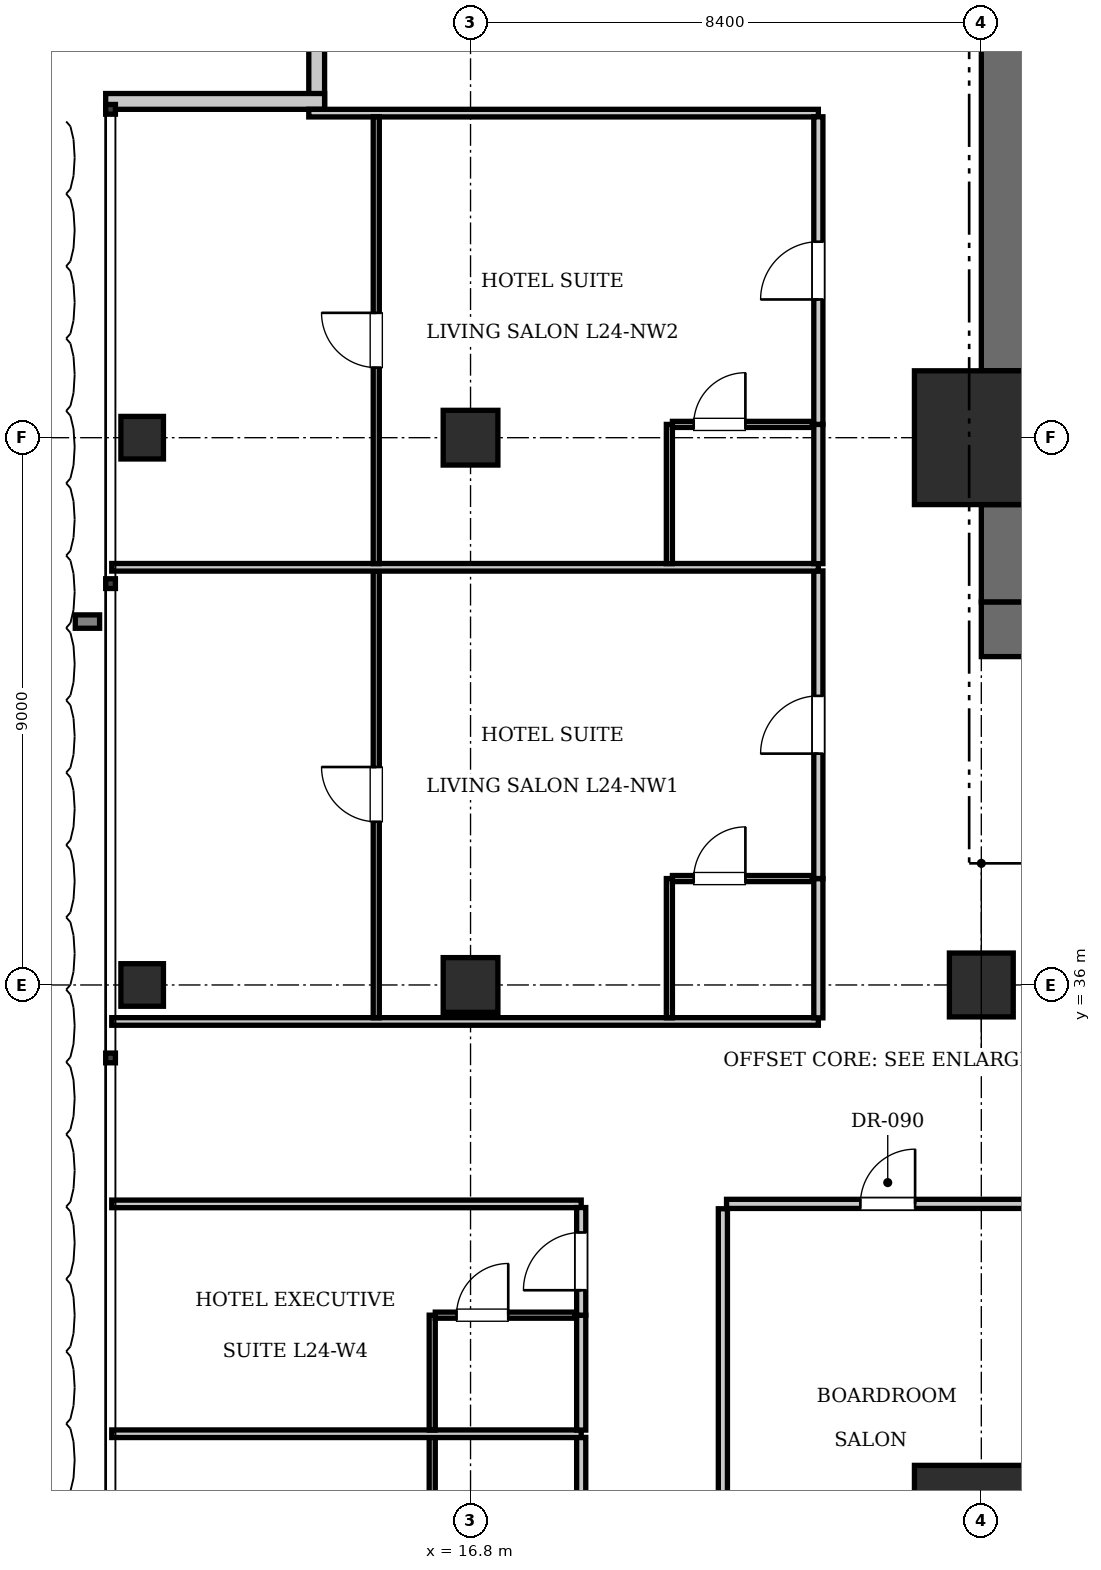
"""IFC4 building model, lengths in metres.
Left out: names, types, materials, properties, quantities, classifications, styles, units other than length and angle.
Written with IfcOpenShell. Run it as: python <this file> out.ifc"""

import sys

from ifc_helpers import new_model, si_unit, direction, frame, frame_2d, origin, origin_2d, place, context, subcontext, project, spatial, rectangle, i_section, extrude, element, fill, save


model = new_model("IFC4")
c1 = context("Model", 3, precision=1e-05, world=origin(), true_north=direction((0.0, 1.0)))
c2 = subcontext(c1, "Body", "Model", "MODEL_VIEW")
j1 = project(units=[si_unit("LENGTHUNIT", "METRE"), si_unit("PLANEANGLEUNIT", "RADIAN")], contexts=[c1])
p1 = place(None, origin())
s1 = spatial("IfcSite", under=j1, at=p1, CompositionType="ELEMENT")
p2 = place(p1, origin())
s2 = spatial("IfcBuilding", under=s1, at=p2, CompositionType="ELEMENT")
p3 = place(p2, frame((0.0, 0.0, 100.1)))
s3 = spatial("IfcBuildingStorey", under=s2, at=p3, CompositionType="ELEMENT", Elevation=100.1)
for number, where, z_axis, x_axis in (
    (1, (25.2, 27.0, 0.0), (0.0, 0.0, 1.0), (1.0, 0.0, 0.0)),
    (2, (25.2, 45.0, 0.0), (0.0, 0.0, 1.0), (1.0, 0.0, 0.0)),
):
    element("IfcColumn", number, at=place(p3, frame(where, z_axis=z_axis, x_axis=x_axis)), inside=s3, PredefinedType="COLUMN", context=c2, shape_type="SweptSolid", body=[
        extrude(rectangle(XDim=2.2, YDim=2.2, at=origin_2d()), origin(), (0.0, 0.0, 1.0), 3.85),
    ])
p4 = place(p3, frame((25.2, 41.85, 0.0), z_axis=(0.0, 0.0, 1.0), x_axis=(1.0, 0.0, 0.0)))
e3 = element("IfcWall", 3, at=p4, inside=s3, PredefinedType="SHEAR", context=c2, shape_type="SweptSolid", body=[
    extrude(rectangle(XDim=6.8, YDim=0.9, at=frame_2d((3.4, 0.0))), origin(), (0.0, 0.0, 1.0), 3.85),
])
p5 = place(p4, frame((1.65, 0.0, 0.0)))
e4 = element("IfcOpeningElement", 4, at=p5, cuts=e3, PredefinedType="OPENING", context=c2, shape_type="SweptSolid", body=[
    extrude(rectangle(XDim=1.15, YDim=2.15, at=frame_2d((0.575, 1.075))), frame((0.0, 0.46, 0.0), z_axis=(0.0, -1.0, 0.0), x_axis=(1.0, 0.0, 0.0)), (0.0, 0.0, 1.0), 0.92),
])
p6 = place(p4, frame((5.15, 0.0, 0.0)))
e5 = element("IfcOpeningElement", 5, at=p6, cuts=e3, PredefinedType="OPENING", context=c2, shape_type="SweptSolid", body=[
    extrude(rectangle(XDim=1.1, YDim=2.2, at=frame_2d((0.55, 1.1))), frame((0.0, 0.46, 0.0), z_axis=(0.0, -1.0, 0.0), x_axis=(1.0, 0.0, 0.0)), (0.0, 0.0, 1.0), 0.92),
])
p7 = place(p3, frame((25.65, 42.3, 0.0), z_axis=(0.0, 0.0, 1.0), x_axis=(0.0, 1.0, 0.0)))
e6 = element("IfcWall", 6, at=p7, inside=s3, PredefinedType="SHEAR", context=c2, shape_type="SweptSolid", body=[
    extrude(rectangle(XDim=1.6, YDim=0.9, at=frame_2d((0.8, 0.0))), origin(), (0.0, 0.0, 1.0), 3.85),
])
p8 = place(p3, frame((25.65, 46.1, 0.0), z_axis=(0.0, 0.0, 1.0), x_axis=(0.0, 1.0, 0.0)))
e7 = element("IfcWall", 7, at=p8, inside=s3, PredefinedType="SHEAR", context=c2, shape_type="SweptSolid", body=[
    extrude(rectangle(XDim=7.0, YDim=0.9, at=frame_2d((3.5, 0.0))), origin(), (0.0, 0.0, 1.0), 3.85),
])
p9 = place(p3, frame((25.2, 36.0, 0.0), z_axis=(0.0, 0.0, 1.0), x_axis=(1.0, 0.0, 0.0)))
e8 = element("IfcColumn", 8, at=p9, inside=s3, PredefinedType="COLUMN", context=c2, shape_type="SweptSolid", body=[
    extrude(rectangle(XDim=1.05, YDim=1.05, at=origin_2d()), origin(), (0.0, 0.0, 1.0), 3.85),
])
for number, where, z_axis, x_axis in (
    (9, (16.8, 36.0, 0.0), (0.0, 0.0, 1.0), (1.0, 0.0, 0.0)),
    (10, (16.8, 45.0, 0.0), (0.0, 0.0, 1.0), (1.0, 0.0, 0.0)),
):
    element("IfcColumn", number, at=place(p3, frame(where, z_axis=z_axis, x_axis=x_axis)), inside=s3, PredefinedType="COLUMN", context=c2, shape_type="SweptSolid", body=[
        extrude(rectangle(XDim=0.9, YDim=0.9, at=origin_2d()), origin(), (0.0, 0.0, 1.0), 3.85),
    ])
for number, where, z_axis, x_axis in (
    (11, (11.4, 36.0, 0.0), (0.0, 0.0, 1.0), (1.0, 0.0, 0.0)),
    (12, (11.4, 45.0, 0.0), (0.0, 0.0, 1.0), (1.0, 0.0, 0.0)),
):
    element("IfcColumn", number, at=place(p3, frame(where, z_axis=z_axis, x_axis=x_axis)), inside=s3, PredefinedType="COLUMN", context=c2, shape_type="SweptSolid", body=[
        extrude(i_section(OverallWidth=0.7, OverallDepth=0.7, WebThickness=0.028, FlangeThickness=0.044, at=origin_2d()), origin(), (0.0, 0.0, 1.0), 3.85),
    ])
p10 = place(p3, frame((14.27, 50.4, 0.0), z_axis=(0.0, 0.0, 1.0), x_axis=(0.0, 1.0, 0.0)))
e13 = element("IfcWall", 13, at=p10, inside=s3, PredefinedType="SOLIDWALL", context=c2, shape_type="SweptSolid", body=[
    extrude(rectangle(XDim=3.6, YDim=0.26, at=frame_2d((1.8, 0.0))), origin(), (0.0, 0.0, 1.0), 3.61),
])
p11 = place(p3, frame((10.8, 50.53, 0.0), z_axis=(0.0, 0.0, 1.0), x_axis=(1.0, 0.0, 0.0)))
e14 = element("IfcWall", 14, at=p11, inside=s3, PredefinedType="SOLIDWALL", context=c2, shape_type="SweptSolid", body=[
    extrude(rectangle(XDim=3.6, YDim=0.26, at=frame_2d((1.8, 0.0))), origin(), (0.0, 0.0, 1.0), 3.61),
])
p12 = place(p3, frame((20.95, 24.98, 0.0), z_axis=(0.0, 0.0, 1.0), x_axis=(0.0, 1.0, 0.0)))
e15 = element("IfcWall", 15, at=p12, inside=s3, PredefinedType="PARTITIONING", context=c2, shape_type="SweptSolid", body=[
    extrude(rectangle(XDim=7.34, YDim=0.15, at=frame_2d((3.67, 0.0))), origin(), (0.0, 0.0, 1.0), 3.255),
])
p13 = place(p3, frame((21.01, 32.4, 0.0), z_axis=(0.0, 0.0, 1.0), x_axis=(1.0, 0.0, 0.0)))
e16 = element("IfcWall", 16, at=p13, inside=s3, PredefinedType="PARTITIONING", context=c2, shape_type="SweptSolid", body=[
    extrude(rectangle(XDim=5.302, YDim=0.15, at=frame_2d((2.651, 0.0))), origin(), (0.0, 0.0, 1.0), 3.61),
])
p14 = place(p13, frame((2.201, 0.0, 0.0)))
e17 = element("IfcOpeningElement", 17, at=p14, cuts=e16, PredefinedType="OPENING", context=c2, shape_type="SweptSolid", body=[
    extrude(rectangle(XDim=0.9, YDim=2.1, at=frame_2d((0.45, 1.05))), frame((0.0, 0.085, 0.0), z_axis=(0.0, -1.0, 0.0), x_axis=(1.0, 0.0, 0.0)), (0.0, 0.0, 1.0), 0.17),
])
p15 = place(p3, frame((10.9, 32.4, 0.0), z_axis=(0.0, 0.0, 1.0), x_axis=(1.0, 0.0, 0.0)))
e18 = element("IfcWall", 18, at=p15, inside=s3, PredefinedType="PARTITIONING", context=c2, shape_type="SweptSolid", body=[
    extrude(rectangle(XDim=7.72, YDim=0.125, at=frame_2d((3.86, 0.0))), origin(), (0.0, 0.0, 1.0), 3.61),
])
p16 = place(p3, frame((18.62, 26.67, 0.0), z_axis=(0.0, 0.0, 1.0), x_axis=(0.0, 1.0, 0.0)))
e19 = element("IfcWall", 19, at=p16, inside=s3, PredefinedType="PARTITIONING", context=c2, shape_type="SweptSolid", body=[
    extrude(rectangle(XDim=1.89, YDim=0.15, at=frame_2d((0.945, 0.0))), origin(), (0.0, 0.0, 1.0), 3.61),
])
p17 = place(p3, frame((16.17, 26.67, 0.0), z_axis=(0.0, 0.0, 1.0), x_axis=(0.0, 1.0, 0.0)))
e20 = element("IfcWall", 20, at=p17, inside=s3, PredefinedType="PARTITIONING", context=c2, shape_type="SweptSolid", body=[
    extrude(rectangle(XDim=1.89, YDim=0.1, at=frame_2d((0.945, 0.0))), origin(), (0.0, 0.0, 1.0), 3.61),
])
p18 = place(p3, frame((10.9, 28.62, 0.0), z_axis=(0.0, 0.0, 1.0), x_axis=(1.0, 0.0, 0.0)))
e21 = element("IfcWall", 21, at=p18, inside=s3, PredefinedType="PARTITIONING", context=c2, shape_type="SweptSolid", body=[
    extrude(rectangle(XDim=7.72, YDim=0.125, at=frame_2d((3.86, 0.0))), origin(), (0.0, 0.0, 1.0), 3.61),
])
p19 = place(p3, frame((18.62, 28.68, 0.0), z_axis=(0.0, 0.0, 1.0), x_axis=(0.0, 1.0, 0.0)))
e22 = element("IfcWall", 22, at=p19, inside=s3, PredefinedType="PARTITIONING", context=c2, shape_type="SweptSolid", body=[
    extrude(rectangle(XDim=1.89, YDim=0.15, at=frame_2d((0.945, 0.0))), origin(), (0.0, 0.0, 1.0), 3.61),
])
p20 = place(p3, frame((18.62, 30.57, 0.0), z_axis=(0.0, 0.0, 1.0), x_axis=(0.0, 1.0, 0.0)))
e23 = element("IfcWall", 23, at=p20, inside=s3, PredefinedType="PARTITIONING", context=c2, shape_type="SweptSolid", body=[
    extrude(rectangle(XDim=1.77, YDim=0.15, at=frame_2d((0.885, 0.0))), origin(), (0.0, 0.0, 1.0), 3.61),
])
p21 = place(p20, frame((0.41, 0.0, 0.0)))
e24 = element("IfcOpeningElement", 24, at=p21, cuts=e23, PredefinedType="OPENING", context=c2, shape_type="SweptSolid", body=[
    extrude(rectangle(XDim=0.95, YDim=2.15, at=frame_2d((0.475, 1.075))), frame((0.0, 0.085, 0.0), z_axis=(0.0, -1.0, 0.0), x_axis=(1.0, 0.0, 0.0)), (0.0, 0.0, 1.0), 0.17),
])
p22 = place(p3, frame((16.17, 28.68, 0.0), z_axis=(0.0, 0.0, 1.0), x_axis=(0.0, 1.0, 0.0)))
e25 = element("IfcWall", 25, at=p22, inside=s3, PredefinedType="PARTITIONING", context=c2, shape_type="SweptSolid", body=[
    extrude(rectangle(XDim=1.89, YDim=0.1, at=frame_2d((0.945, 0.0))), origin(), (0.0, 0.0, 1.0), 3.61),
])
p23 = place(p3, frame((16.22, 30.57, 0.0), z_axis=(0.0, 0.0, 1.0), x_axis=(1.0, 0.0, 0.0)))
e26 = element("IfcWall", 26, at=p23, inside=s3, PredefinedType="PARTITIONING", context=c2, shape_type="SweptSolid", body=[
    extrude(rectangle(XDim=2.3, YDim=0.1, at=frame_2d((1.15, 0.0))), origin(), (0.0, 0.0, 1.0), 3.61),
])
p24 = place(p23, frame((0.35, 0.0, 0.0)))
e27 = element("IfcOpeningElement", 27, at=p24, cuts=e26, PredefinedType="OPENING", context=c2, shape_type="SweptSolid", body=[
    extrude(rectangle(XDim=0.85, YDim=2.1, at=frame_2d((0.425, 1.05))), frame((0.0, 0.06, 0.0), z_axis=(0.0, -1.0, 0.0), x_axis=(1.0, 0.0, 0.0)), (0.0, 0.0, 1.0), 0.12),
])
p25 = place(p3, frame((10.9, 35.4, 0.0), z_axis=(0.0, 0.0, 1.0), x_axis=(1.0, 0.0, 0.0)))
e28 = element("IfcWall", 28, at=p25, inside=s3, PredefinedType="PARTITIONING", context=c2, shape_type="SweptSolid", body=[
    extrude(rectangle(XDim=11.62, YDim=0.125, at=frame_2d((5.81, 0.0))), origin(), (0.0, 0.0, 1.0), 3.61),
])
p26 = place(p3, frame((14.14, 50.337, 0.0), z_axis=(0.0, 0.0, 1.0), x_axis=(1.0, 0.0, 0.0)))
e29 = element("IfcWall", 29, at=p26, inside=s3, PredefinedType="PARTITIONING", context=c2, shape_type="SweptSolid", body=[
    extrude(rectangle(XDim=8.38, YDim=0.125, at=frame_2d((4.19, 0.0))), origin(), (0.0, 0.0, 1.0), 3.61),
])
p27 = place(p3, frame((22.52, 35.46, 0.0), z_axis=(0.0, 0.0, 1.0), x_axis=(0.0, 1.0, 0.0)))
e30 = element("IfcWall", 30, at=p27, inside=s3, PredefinedType="PARTITIONING", context=c2, shape_type="SweptSolid", body=[
    extrude(rectangle(XDim=2.29, YDim=0.15, at=frame_2d((1.145, 0.0))), origin(), (0.0, 0.0, 1.0), 3.61),
])
p28 = place(p3, frame((22.52, 37.75, 0.0), z_axis=(0.0, 0.0, 1.0), x_axis=(0.0, 1.0, 0.0)))
e31 = element("IfcWall", 31, at=p28, inside=s3, PredefinedType="PARTITIONING", context=c2, shape_type="SweptSolid", body=[
    extrude(rectangle(XDim=5.059, YDim=0.15, at=frame_2d((2.529, 0.0))), origin(), (0.0, 0.0, 1.0), 3.61),
])
p29 = place(p28, frame((2.054, 0.0, 0.0)))
e32 = element("IfcOpeningElement", 32, at=p29, cuts=e31, PredefinedType="OPENING", context=c2, shape_type="SweptSolid", body=[
    extrude(rectangle(XDim=0.95, YDim=2.15, at=frame_2d((0.475, 1.075))), frame((0.0, 0.085, 0.0), z_axis=(0.0, -1.0, 0.0), x_axis=(1.0, 0.0, 0.0)), (0.0, 0.0, 1.0), 0.17),
])
p30 = place(p3, frame((20.07, 35.46, 0.0), z_axis=(0.0, 0.0, 1.0), x_axis=(0.0, 1.0, 0.0)))
e33 = element("IfcWall", 33, at=p30, inside=s3, PredefinedType="PARTITIONING", context=c2, shape_type="SweptSolid", body=[
    extrude(rectangle(XDim=2.29, YDim=0.1, at=frame_2d((1.145, 0.0))), origin(), (0.0, 0.0, 1.0), 3.61),
])
p31 = place(p3, frame((20.12, 37.75, 0.0), z_axis=(0.0, 0.0, 1.0), x_axis=(1.0, 0.0, 0.0)))
e34 = element("IfcWall", 34, at=p31, inside=s3, PredefinedType="PARTITIONING", context=c2, shape_type="SweptSolid", body=[
    extrude(rectangle(XDim=2.3, YDim=0.1, at=frame_2d((1.15, 0.0))), origin(), (0.0, 0.0, 1.0), 3.61),
])
p32 = place(p31, frame((0.35, 0.0, 0.0)))
e35 = element("IfcOpeningElement", 35, at=p32, cuts=e34, PredefinedType="OPENING", context=c2, shape_type="SweptSolid", body=[
    extrude(rectangle(XDim=0.85, YDim=2.1, at=frame_2d((0.425, 1.05))), frame((0.0, 0.06, 0.0), z_axis=(0.0, -1.0, 0.0), x_axis=(1.0, 0.0, 0.0)), (0.0, 0.0, 1.0), 0.12),
])
p33 = place(p3, frame((15.25, 35.46, 0.0), z_axis=(0.0, 0.0, 1.0), x_axis=(0.0, 1.0, 0.0)))
e36 = element("IfcWall", 36, at=p33, inside=s3, PredefinedType="PARTITIONING", context=c2, shape_type="SweptSolid", body=[
    extrude(rectangle(XDim=7.349, YDim=0.1, at=frame_2d((3.674, 0.0))), origin(), (0.0, 0.0, 1.0), 3.61),
])
p34 = place(p33, frame((3.224, 0.0, 0.0)))
e37 = element("IfcOpeningElement", 37, at=p34, cuts=e36, PredefinedType="OPENING", context=c2, shape_type="SweptSolid", body=[
    extrude(rectangle(XDim=0.9, YDim=2.1, at=frame_2d((0.45, 1.05))), frame((0.0, 0.06, 0.0), z_axis=(0.0, -1.0, 0.0), x_axis=(1.0, 0.0, 0.0)), (0.0, 0.0, 1.0), 0.12),
])
p35 = place(p3, frame((10.9, 42.869, 0.0), z_axis=(0.0, 0.0, 1.0), x_axis=(1.0, 0.0, 0.0)))
e38 = element("IfcWall", 38, at=p35, inside=s3, PredefinedType="PARTITIONING", context=c2, shape_type="SweptSolid", body=[
    extrude(rectangle(XDim=11.62, YDim=0.125, at=frame_2d((5.81, 0.0))), origin(), (0.0, 0.0, 1.0), 3.61),
])
p36 = place(p3, frame((22.52, 42.929, 0.0), z_axis=(0.0, 0.0, 1.0), x_axis=(0.0, 1.0, 0.0)))
e39 = element("IfcWall", 39, at=p36, inside=s3, PredefinedType="PARTITIONING", context=c2, shape_type="SweptSolid", body=[
    extrude(rectangle(XDim=2.29, YDim=0.15, at=frame_2d((1.145, 0.0))), origin(), (0.0, 0.0, 1.0), 3.61),
])
p37 = place(p3, frame((22.52, 45.219, 0.0), z_axis=(0.0, 0.0, 1.0), x_axis=(0.0, 1.0, 0.0)))
e40 = element("IfcWall", 40, at=p37, inside=s3, PredefinedType="PARTITIONING", context=c2, shape_type="SweptSolid", body=[
    extrude(rectangle(XDim=5.059, YDim=0.15, at=frame_2d((2.529, 0.0))), origin(), (0.0, 0.0, 1.0), 3.61),
])
p38 = place(p37, frame((2.054, 0.0, 0.0)))
e41 = element("IfcOpeningElement", 41, at=p38, cuts=e40, PredefinedType="OPENING", context=c2, shape_type="SweptSolid", body=[
    extrude(rectangle(XDim=0.95, YDim=2.15, at=frame_2d((0.475, 1.075))), frame((0.0, 0.085, 0.0), z_axis=(0.0, -1.0, 0.0), x_axis=(1.0, 0.0, 0.0)), (0.0, 0.0, 1.0), 0.17),
])
p39 = place(p3, frame((20.07, 42.929, 0.0), z_axis=(0.0, 0.0, 1.0), x_axis=(0.0, 1.0, 0.0)))
e42 = element("IfcWall", 42, at=p39, inside=s3, PredefinedType="PARTITIONING", context=c2, shape_type="SweptSolid", body=[
    extrude(rectangle(XDim=2.29, YDim=0.1, at=frame_2d((1.145, 0.0))), origin(), (0.0, 0.0, 1.0), 3.61),
])
p40 = place(p3, frame((20.12, 45.219, 0.0), z_axis=(0.0, 0.0, 1.0), x_axis=(1.0, 0.0, 0.0)))
e43 = element("IfcWall", 43, at=p40, inside=s3, PredefinedType="PARTITIONING", context=c2, shape_type="SweptSolid", body=[
    extrude(rectangle(XDim=2.3, YDim=0.1, at=frame_2d((1.15, 0.0))), origin(), (0.0, 0.0, 1.0), 3.61),
])
p41 = place(p40, frame((0.35, 0.0, 0.0)))
e44 = element("IfcOpeningElement", 44, at=p41, cuts=e43, PredefinedType="OPENING", context=c2, shape_type="SweptSolid", body=[
    extrude(rectangle(XDim=0.85, YDim=2.1, at=frame_2d((0.425, 1.05))), frame((0.0, 0.06, 0.0), z_axis=(0.0, -1.0, 0.0), x_axis=(1.0, 0.0, 0.0)), (0.0, 0.0, 1.0), 0.12),
])
p42 = place(p3, frame((15.25, 42.929, 0.0), z_axis=(0.0, 0.0, 1.0), x_axis=(0.0, 1.0, 0.0)))
e45 = element("IfcWall", 45, at=p42, inside=s3, PredefinedType="PARTITIONING", context=c2, shape_type="SweptSolid", body=[
    extrude(rectangle(XDim=7.349, YDim=0.1, at=frame_2d((3.674, 0.0))), origin(), (0.0, 0.0, 1.0), 3.61),
])
p43 = place(p42, frame((3.224, 0.0, 0.0)))
e46 = element("IfcOpeningElement", 46, at=p43, cuts=e45, PredefinedType="OPENING", context=c2, shape_type="SweptSolid", body=[
    extrude(rectangle(XDim=0.9, YDim=2.1, at=frame_2d((0.45, 1.05))), frame((0.0, 0.06, 0.0), z_axis=(0.0, -1.0, 0.0), x_axis=(1.0, 0.0, 0.0)), (0.0, 0.0, 1.0), 0.12),
])
p44 = place(p14, origin())
e47 = element("IfcDoor", 47, at=p44, inside=s3, OperationType="SINGLE_SWING_RIGHT", PredefinedType="DOOR", context=c2, shape_type="SweptSolid", body=[
    extrude(rectangle(XDim=0.9, YDim=2.1, at=frame_2d((0.45, 1.05))), frame((0.0, 0.025, 0.0), z_axis=(0.0, -1.0, 0.0), x_axis=(1.0, 0.0, 0.0)), (0.0, 0.0, 1.0), 0.05),
])
fill(e17, e47)
p45 = place(p24, origin())
e48 = element("IfcDoor", 48, at=p45, inside=s3, OperationType="SINGLE_SWING_RIGHT", PredefinedType="DOOR", context=c2, shape_type="SweptSolid", body=[
    extrude(rectangle(XDim=0.85, YDim=2.1, at=frame_2d((0.425, 1.05))), frame((0.0, 0.025, 0.0), z_axis=(0.0, -1.0, 0.0), x_axis=(1.0, 0.0, 0.0)), (0.0, 0.0, 1.0), 0.05),
])
fill(e27, e48)
p46 = place(p21, origin())
e49 = element("IfcDoor", 49, at=p46, inside=s3, OperationType="SINGLE_SWING_LEFT", PredefinedType="DOOR", context=c2, shape_type="SweptSolid", body=[
    extrude(rectangle(XDim=0.95, YDim=2.15, at=frame_2d((0.475, 1.075))), frame((0.0, 0.025, 0.0), z_axis=(0.0, -1.0, 0.0), x_axis=(1.0, 0.0, 0.0)), (0.0, 0.0, 1.0), 0.05),
])
fill(e24, e49)
p47 = place(p32, origin())
e50 = element("IfcDoor", 50, at=p47, inside=s3, OperationType="SINGLE_SWING_RIGHT", PredefinedType="DOOR", context=c2, shape_type="SweptSolid", body=[
    extrude(rectangle(XDim=0.85, YDim=2.1, at=frame_2d((0.425, 1.05))), frame((0.0, 0.025, 0.0), z_axis=(0.0, -1.0, 0.0), x_axis=(1.0, 0.0, 0.0)), (0.0, 0.0, 1.0), 0.05),
])
fill(e35, e50)
p48 = place(p29, origin())
e51 = element("IfcDoor", 51, at=p48, inside=s3, OperationType="SINGLE_SWING_LEFT", PredefinedType="DOOR", context=c2, shape_type="SweptSolid", body=[
    extrude(rectangle(XDim=0.95, YDim=2.15, at=frame_2d((0.475, 1.075))), frame((0.0, 0.025, 0.0), z_axis=(0.0, -1.0, 0.0), x_axis=(1.0, 0.0, 0.0)), (0.0, 0.0, 1.0), 0.05),
])
fill(e32, e51)
p49 = place(p34, origin())
e52 = element("IfcDoor", 52, at=p49, inside=s3, OperationType="SINGLE_SWING_RIGHT", PredefinedType="DOOR", context=c2, shape_type="SweptSolid", body=[
    extrude(rectangle(XDim=0.9, YDim=2.1, at=frame_2d((0.45, 1.05))), frame((0.0, 0.025, 0.0), z_axis=(0.0, -1.0, 0.0), x_axis=(1.0, 0.0, 0.0)), (0.0, 0.0, 1.0), 0.05),
])
fill(e37, e52)
p50 = place(p41, origin())
e53 = element("IfcDoor", 53, at=p50, inside=s3, OperationType="SINGLE_SWING_RIGHT", PredefinedType="DOOR", context=c2, shape_type="SweptSolid", body=[
    extrude(rectangle(XDim=0.85, YDim=2.1, at=frame_2d((0.425, 1.05))), frame((0.0, 0.025, 0.0), z_axis=(0.0, -1.0, 0.0), x_axis=(1.0, 0.0, 0.0)), (0.0, 0.0, 1.0), 0.05),
])
fill(e44, e53)
p51 = place(p38, origin())
e54 = element("IfcDoor", 54, at=p51, inside=s3, OperationType="SINGLE_SWING_LEFT", PredefinedType="DOOR", context=c2, shape_type="SweptSolid", body=[
    extrude(rectangle(XDim=0.95, YDim=2.15, at=frame_2d((0.475, 1.075))), frame((0.0, 0.025, 0.0), z_axis=(0.0, -1.0, 0.0), x_axis=(1.0, 0.0, 0.0)), (0.0, 0.0, 1.0), 0.05),
])
fill(e41, e54)
p52 = place(p43, origin())
e55 = element("IfcDoor", 55, at=p52, inside=s3, OperationType="SINGLE_SWING_RIGHT", PredefinedType="DOOR", context=c2, shape_type="SweptSolid", body=[
    extrude(rectangle(XDim=0.9, YDim=2.1, at=frame_2d((0.45, 1.05))), frame((0.0, 0.025, 0.0), z_axis=(0.0, -1.0, 0.0), x_axis=(1.0, 0.0, 0.0)), (0.0, 0.0, 1.0), 0.05),
])
fill(e46, e55)
save(model, sys.argv[1])
